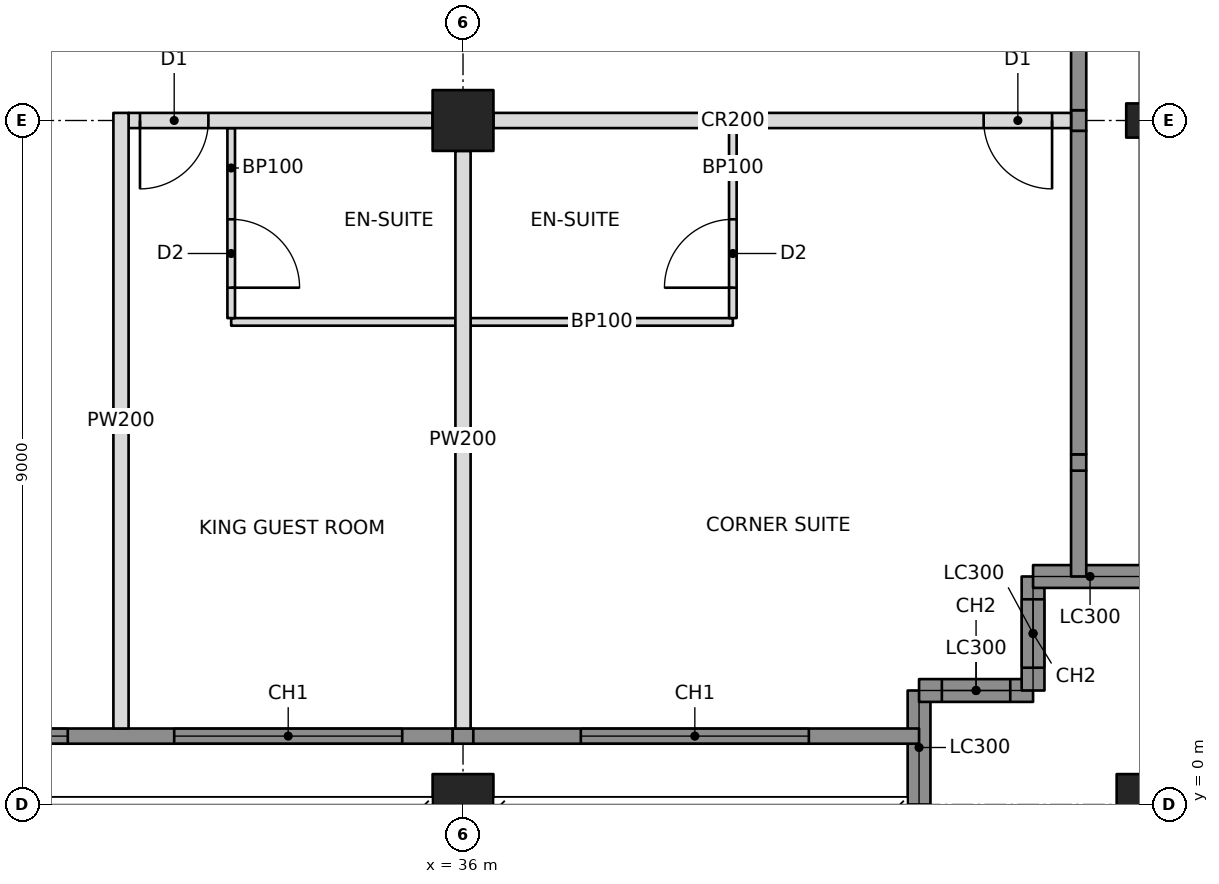
"""IFC4 building model, lengths in metres.
Left out: names, types, materials, properties, quantities, classifications, styles, units other than length and angle.
Written with IfcOpenShell. Run it as: python <this file> out.ifc"""

import sys

from ifc_helpers import new_model, si_unit, direction, frame, frame_2d, origin, origin_2d, place, context, subcontext, project, spatial, rectangle, hollow_rectangle, i_section, extrude, element, fill, save


model = new_model("IFC4")
c1 = context("Model", 3, precision=1e-05, world=origin(), true_north=direction((0.0, 1.0)))
c2 = subcontext(c1, "Body", "Model", "MODEL_VIEW")
j1 = project(units=[si_unit("LENGTHUNIT", "METRE"), si_unit("PLANEANGLEUNIT", "RADIAN")], contexts=[c1])
p1 = place(None, origin())
s1 = spatial("IfcSite", under=j1, at=p1, CompositionType="ELEMENT")
p2 = place(p1, origin())
s2 = spatial("IfcBuilding", under=s1, at=p2, CompositionType="ELEMENT")
p3 = place(p2, frame((0.0, 0.0, 167.2)))
s3 = spatial("IfcBuildingStorey", under=s2, at=p3, CompositionType="ELEMENT", Elevation=167.2)
p4 = place(p3, frame((36.0, 0.0, 0.0), z_axis=(0.0, 0.0, 1.0), x_axis=(1.0, 0.0, 0.0)))
e1 = element("IfcColumn", 1, at=p4, inside=s3, PredefinedType="COLUMN", context=c2, shape_type="SweptSolid", body=[
    extrude(hollow_rectangle(XDim=0.8, YDim=0.8, WallThickness=0.07, at=origin_2d()), origin(), (0.0, 0.0, 1.0), 3.4),
])
p5 = place(p3, frame((36.0, 9.0, 0.0), z_axis=(0.0, 0.0, 1.0), x_axis=(0.0, 1.0, 0.0)))
e2 = element("IfcColumn", 2, at=p5, inside=s3, PredefinedType="COLUMN", context=c2, shape_type="SweptSolid", body=[
    extrude(hollow_rectangle(XDim=0.8, YDim=0.8, WallThickness=0.06, at=origin_2d()), origin(), (0.0, 0.0, 1.0), 3.4),
])
p6 = place(p3, frame((45.0, 0.0, 0.0), z_axis=(0.0, 0.0, 1.0), x_axis=(1.0, 0.0, 0.0)))
e3 = element("IfcColumn", 3, at=p6, inside=s3, PredefinedType="COLUMN", context=c2, shape_type="SweptSolid", body=[
    extrude(hollow_rectangle(XDim=0.8, YDim=0.8, WallThickness=0.07, at=origin_2d()), origin(), (0.0, 0.0, 1.0), 3.4),
])
p7 = place(p3, frame((45.0, 9.0, 0.0), z_axis=(0.0, 0.0, 1.0), x_axis=(0.0, 1.0, 0.0)))
e4 = element("IfcColumn", 4, at=p7, inside=s3, PredefinedType="COLUMN", context=c2, shape_type="SweptSolid", body=[
    extrude(i_section(OverallWidth=0.449, OverallDepth=0.549, WebThickness=0.072, FlangeThickness=0.115, at=origin_2d()), origin(), (0.0, 0.0, 1.0), 3.4),
])
p8 = place(p3, frame((42.0, 0.0, 0.0), z_axis=(0.0, 0.0, 1.0), x_axis=(0.0, 1.0, 0.0)))
e5 = element("IfcWall", 5, at=p8, inside=s3, PredefinedType="SOLIDWALL", context=c2, shape_type="SweptSolid", body=[
    extrude(rectangle(XDim=1.5, YDim=0.3, at=frame_2d((0.75, 0.0))), origin(), (0.0, 0.0, 1.0), 2.42),
])
p9 = place(p3, frame((42.0, 1.5, 0.0), z_axis=(0.0, 0.0, 1.0), x_axis=(1.0, 0.0, 0.0)))
e6 = element("IfcWall", 6, at=p9, inside=s3, PredefinedType="SOLIDWALL", context=c2, shape_type="SweptSolid", body=[
    extrude(rectangle(XDim=1.5, YDim=0.3, at=frame_2d((0.75, 0.0))), origin(), (0.0, 0.0, 1.0), 3.2),
])
p10 = place(p9, frame((0.3, 0.0, 0.6)))
e7 = element("IfcOpeningElement", 7, at=p10, cuts=e6, PredefinedType="OPENING", context=c2, shape_type="SweptSolid", body=[
    extrude(rectangle(XDim=0.9, YDim=2.2, at=frame_2d((0.45, 1.1))), frame((0.0, 0.16, 0.0), z_axis=(0.0, -1.0, 0.0), x_axis=(1.0, 0.0, 0.0)), (0.0, 0.0, 1.0), 0.32),
])
p11 = place(p3, frame((43.5, 1.5, 0.0), z_axis=(0.0, 0.0, 1.0), x_axis=(0.0, 1.0, 0.0)))
e8 = element("IfcWall", 8, at=p11, inside=s3, PredefinedType="SOLIDWALL", context=c2, shape_type="SweptSolid", body=[
    extrude(rectangle(XDim=1.5, YDim=0.3, at=frame_2d((0.75, 0.0))), origin(), (0.0, 0.0, 1.0), 3.2),
])
p12 = place(p11, frame((0.3, 0.0, 0.6)))
e9 = element("IfcOpeningElement", 9, at=p12, cuts=e8, PredefinedType="OPENING", context=c2, shape_type="SweptSolid", body=[
    extrude(rectangle(XDim=0.9, YDim=2.2, at=frame_2d((0.45, 1.1))), frame((0.0, 0.16, 0.0), z_axis=(0.0, -1.0, 0.0), x_axis=(1.0, 0.0, 0.0)), (0.0, 0.0, 1.0), 0.32),
])
p13 = place(p3, frame((43.5, 3.0, 0.0), z_axis=(0.0, 0.0, 1.0), x_axis=(1.0, 0.0, 0.0)))
e10 = element("IfcWall", 10, at=p13, inside=s3, PredefinedType="SOLIDWALL", context=c2, shape_type="SweptSolid", body=[
    extrude(rectangle(XDim=1.5, YDim=0.3, at=frame_2d((0.75, 0.0))), origin(), (0.0, 0.0, 1.0), 2.42),
])
p14 = place(p3, frame((44.1, 3.0, 0.0), z_axis=(0.0, 0.0, 1.0), x_axis=(0.0, 1.0, 0.0)))
e11 = element("IfcWall", 11, at=p14, inside=s3, PredefinedType="SOLIDWALL", context=c2, shape_type="SweptSolid", body=[
    extrude(rectangle(XDim=1.393, YDim=0.2, at=frame_2d((0.696, 0.0))), origin(), (0.0, 0.0, 1.0), 3.2),
])
p15 = place(p3, frame((31.6, 9.0, 0.0), z_axis=(0.0, 0.0, 1.0), x_axis=(1.0, 0.0, 0.0)))
e12 = element("IfcWall", 12, at=p15, inside=s3, PredefinedType="PARTITIONING", context=c2, shape_type="SweptSolid", body=[
    extrude(rectangle(XDim=4.0, YDim=0.2, at=frame_2d((2.0, 0.0))), origin(), (0.0, 0.0, 1.0), 2.405),
])
p16 = place(p15, frame((0.15, 0.0, 0.0)))
e13 = element("IfcOpeningElement", 13, at=p16, cuts=e12, PredefinedType="OPENING", context=c2, shape_type="SweptSolid", body=[
    extrude(rectangle(XDim=0.9, YDim=2.1, at=frame_2d((0.45, 1.05))), frame((0.0, 0.11, 0.0), z_axis=(0.0, -1.0, 0.0), x_axis=(1.0, 0.0, 0.0)), (0.0, 0.0, 1.0), 0.22),
])
p17 = place(p3, frame((36.4, 9.0, 0.0), z_axis=(0.0, 0.0, 1.0), x_axis=(1.0, 0.0, 0.0)))
e14 = element("IfcWall", 14, at=p17, inside=s3, PredefinedType="PARTITIONING", context=c2, shape_type="SweptSolid", body=[
    extrude(rectangle(XDim=7.6, YDim=0.2, at=frame_2d((3.8, 0.0))), origin(), (0.0, 0.0, 1.0), 2.438),
])
p18 = place(p17, frame((6.45, 0.0, 0.0)))
e15 = element("IfcOpeningElement", 15, at=p18, cuts=e14, PredefinedType="OPENING", context=c2, shape_type="SweptSolid", body=[
    extrude(rectangle(XDim=0.9, YDim=2.1, at=frame_2d((0.45, 1.05))), frame((0.0, 0.11, 0.0), z_axis=(0.0, -1.0, 0.0), x_axis=(1.0, 0.0, 0.0)), (0.0, 0.0, 1.0), 0.22),
])
p19 = place(p3, frame((31.5, 9.1, 0.0), z_axis=(0.0, 0.0, 1.0), x_axis=(0.0, -1.0, 0.0)))
e16 = element("IfcWall", 16, at=p19, inside=s3, PredefinedType="PARTITIONING", context=c2, shape_type="SweptSolid", body=[
    extrude(rectangle(XDim=8.1, YDim=0.2, at=frame_2d((4.05, 0.0))), origin(), (0.0, 0.0, 1.0), 2.404),
])
p20 = place(p3, frame((36.0, 8.6, 0.0), z_axis=(0.0, 0.0, 1.0), x_axis=(0.0, -1.0, 0.0)))
e17 = element("IfcWall", 17, at=p20, inside=s3, PredefinedType="PARTITIONING", context=c2, shape_type="SweptSolid", body=[
    extrude(rectangle(XDim=7.6, YDim=0.2, at=frame_2d((3.8, 0.0))), origin(), (0.0, 0.0, 1.0), 2.438),
])
p21 = place(p3, frame((32.95, 6.35, 0.0), z_axis=(0.0, 0.0, 1.0), x_axis=(1.0, 0.0, 0.0)))
e18 = element("IfcWall", 18, at=p21, inside=s3, PredefinedType="PARTITIONING", context=c2, shape_type="SweptSolid", body=[
    extrude(rectangle(XDim=2.95, YDim=0.1, at=frame_2d((1.475, 0.0))), origin(), (0.0, 0.0, 1.0), 2.438),
])
p22 = place(p3, frame((32.95, 8.9, 0.0), z_axis=(0.0, 0.0, 1.0), x_axis=(0.0, -1.0, 0.0)))
e19 = element("IfcWall", 19, at=p22, inside=s3, PredefinedType="PARTITIONING", context=c2, shape_type="SweptSolid", body=[
    extrude(rectangle(XDim=2.5, YDim=0.1, at=frame_2d((1.25, 0.0))), origin(), (0.0, 0.0, 1.0), 2.404),
])
p23 = place(p22, frame((1.2, 0.0, 0.0)))
e20 = element("IfcOpeningElement", 20, at=p23, cuts=e19, PredefinedType="OPENING", context=c2, shape_type="SweptSolid", body=[
    extrude(rectangle(XDim=0.9, YDim=2.1, at=frame_2d((0.45, 1.05))), frame((0.0, 0.06, 0.0), z_axis=(0.0, -1.0, 0.0), x_axis=(1.0, 0.0, 0.0)), (0.0, 0.0, 1.0), 0.12),
])
p24 = place(p3, frame((36.1, 6.35, 0.0), z_axis=(0.0, 0.0, 1.0), x_axis=(1.0, 0.0, 0.0)))
e21 = element("IfcWall", 21, at=p24, inside=s3, PredefinedType="PARTITIONING", context=c2, shape_type="SweptSolid", body=[
    extrude(rectangle(XDim=3.45, YDim=0.1, at=frame_2d((1.725, 0.0))), origin(), (0.0, 0.0, 1.0), 2.438),
])
p25 = place(p3, frame((39.55, 8.9, 0.0), z_axis=(0.0, 0.0, 1.0), x_axis=(0.0, -1.0, 0.0)))
e22 = element("IfcWall", 22, at=p25, inside=s3, PredefinedType="PARTITIONING", context=c2, shape_type="SweptSolid", body=[
    extrude(rectangle(XDim=2.5, YDim=0.1, at=frame_2d((1.25, 0.0))), origin(), (0.0, 0.0, 1.0), 2.438),
])
p26 = place(p25, frame((1.2, 0.0, 0.0)))
e23 = element("IfcOpeningElement", 23, at=p26, cuts=e22, PredefinedType="OPENING", context=c2, shape_type="SweptSolid", body=[
    extrude(rectangle(XDim=0.9, YDim=2.1, at=frame_2d((0.45, 1.05))), frame((0.0, 0.06, 0.0), z_axis=(0.0, -1.0, 0.0), x_axis=(1.0, 0.0, 0.0)), (0.0, 0.0, 1.0), 0.12),
])
p27 = place(p3, frame((27.194, 0.9, 0.0), z_axis=(0.0, 0.0, 1.0), x_axis=(1.0, 0.0, 0.0)))
e24 = element("IfcWall", 24, at=p27, inside=s3, PredefinedType="SOLIDWALL", context=c2, shape_type="SweptSolid", body=[
    extrude(rectangle(XDim=8.671, YDim=0.2, at=frame_2d((4.335, 0.0))), origin(), (0.0, 0.0, 1.0), 3.2),
])
p28 = place(p27, frame((0.606, 0.0, 0.6)))
e25 = element("IfcOpeningElement", 25, at=p28, cuts=e24, PredefinedType="OPENING", context=c2, shape_type="SweptSolid", body=[
    extrude(rectangle(XDim=3.0, YDim=2.2, at=frame_2d((1.5, 1.1))), frame((0.0, 0.11, 0.0), z_axis=(0.0, -1.0, 0.0), x_axis=(1.0, 0.0, 0.0)), (0.0, 0.0, 1.0), 0.22),
])
p29 = place(p27, frame((5.006, 0.0, 0.6)))
e26 = element("IfcOpeningElement", 26, at=p29, cuts=e24, PredefinedType="OPENING", context=c2, shape_type="SweptSolid", body=[
    extrude(rectangle(XDim=3.0, YDim=2.2, at=frame_2d((1.5, 1.1))), frame((0.0, 0.11, 0.0), z_axis=(0.0, -1.0, 0.0), x_axis=(1.0, 0.0, 0.0)), (0.0, 0.0, 1.0), 0.22),
])
p30 = place(p3, frame((35.865, 0.9, 0.0), z_axis=(0.0, 0.0, 1.0), x_axis=(1.0, 0.0, 0.0)))
e27 = element("IfcWall", 27, at=p30, inside=s3, PredefinedType="SOLIDWALL", context=c2, shape_type="SweptSolid", body=[
    extrude(rectangle(XDim=0.271, YDim=0.2, at=frame_2d((0.135, 0.0))), origin(), (0.0, 0.0, 1.0), 2.438),
])
p31 = place(p3, frame((36.135, 0.9, 0.0), z_axis=(0.0, 0.0, 1.0), x_axis=(1.0, 0.0, 0.0)))
e28 = element("IfcWall", 28, at=p31, inside=s3, PredefinedType="SOLIDWALL", context=c2, shape_type="SweptSolid", body=[
    extrude(rectangle(XDim=5.865, YDim=0.2, at=frame_2d((2.932, 0.0))), origin(), (0.0, 0.0, 1.0), 3.2),
])
p32 = place(p31, frame((1.415, 0.0, 0.6)))
e29 = element("IfcOpeningElement", 29, at=p32, cuts=e28, PredefinedType="OPENING", context=c2, shape_type="SweptSolid", body=[
    extrude(rectangle(XDim=3.0, YDim=2.2, at=frame_2d((1.5, 1.1))), frame((0.0, 0.11, 0.0), z_axis=(0.0, -1.0, 0.0), x_axis=(1.0, 0.0, 0.0)), (0.0, 0.0, 1.0), 0.22),
])
p33 = place(p3, frame((44.1, 4.393, 0.0), z_axis=(0.0, 0.0, 1.0), x_axis=(0.0, 1.0, 0.0)))
e30 = element("IfcWall", 30, at=p33, inside=s3, PredefinedType="SOLIDWALL", context=c2, shape_type="SweptSolid", body=[
    extrude(rectangle(XDim=0.215, YDim=0.2, at=frame_2d((0.107, 0.0))), origin(), (0.0, 0.0, 1.0), 2.661),
])
p34 = place(p3, frame((44.1, 4.607, 0.0), z_axis=(0.0, 0.0, 1.0), x_axis=(0.0, 1.0, 0.0)))
e31 = element("IfcWall", 31, at=p34, inside=s3, PredefinedType="SOLIDWALL", context=c2, shape_type="SweptSolid", body=[
    extrude(rectangle(XDim=4.257, YDim=0.2, at=frame_2d((2.129, 0.0))), origin(), (0.0, 0.0, 1.0), 3.2),
])
p35 = place(p3, frame((44.1, 8.865, 0.0), z_axis=(0.0, 0.0, 1.0), x_axis=(0.0, 1.0, 0.0)))
e32 = element("IfcWall", 32, at=p35, inside=s3, PredefinedType="SOLIDWALL", context=c2, shape_type="SweptSolid", body=[
    extrude(rectangle(XDim=0.271, YDim=0.2, at=frame_2d((0.135, 0.0))), origin(), (0.0, 0.0, 1.0), 2.438),
])
p36 = place(p3, frame((44.1, 9.135, 0.0), z_axis=(0.0, 0.0, 1.0), x_axis=(0.0, 1.0, 0.0)))
e33 = element("IfcWall", 33, at=p36, inside=s3, PredefinedType="SOLIDWALL", context=c2, shape_type="SweptSolid", body=[
    extrude(rectangle(XDim=8.671, YDim=0.2, at=frame_2d((4.335, 0.0))), origin(), (0.0, 0.0, 1.0), 3.2),
])
p37 = place(p36, frame((2.015, 0.0, 0.6)))
e34 = element("IfcOpeningElement", 34, at=p37, cuts=e33, PredefinedType="OPENING", context=c2, shape_type="SweptSolid", body=[
    extrude(rectangle(XDim=3.0, YDim=2.2, at=frame_2d((1.5, 1.1))), frame((0.0, 0.11, 0.0), z_axis=(0.0, -1.0, 0.0), x_axis=(1.0, 0.0, 0.0)), (0.0, 0.0, 1.0), 0.22),
])
p38 = place(p36, frame((5.515, 0.0, 0.6)))
e35 = element("IfcOpeningElement", 35, at=p38, cuts=e33, PredefinedType="OPENING", context=c2, shape_type="SweptSolid", body=[
    extrude(rectangle(XDim=3.0, YDim=2.2, at=frame_2d((1.5, 1.1))), frame((0.0, 0.11, 0.0), z_axis=(0.0, -1.0, 0.0), x_axis=(1.0, 0.0, 0.0)), (0.0, 0.0, 1.0), 0.22),
])
p39 = place(p10, origin())
e36 = element("IfcWindow", 36, at=p39, inside=s3, PartitioningType="SINGLE_PANEL", PredefinedType="WINDOW", context=c2, shape_type="SweptSolid", body=[
    extrude(rectangle(XDim=0.9, YDim=2.2, at=frame_2d((0.45, 1.1))), frame((0.0, 0.03, 0.0), z_axis=(0.0, -1.0, 0.0), x_axis=(1.0, 0.0, 0.0)), (0.0, 0.0, 1.0), 0.06),
])
fill(e7, e36)
p40 = place(p12, origin())
e37 = element("IfcWindow", 37, at=p40, inside=s3, PartitioningType="SINGLE_PANEL", PredefinedType="WINDOW", context=c2, shape_type="SweptSolid", body=[
    extrude(rectangle(XDim=0.9, YDim=2.2, at=frame_2d((0.45, 1.1))), frame((0.0, 0.03, 0.0), z_axis=(0.0, -1.0, 0.0), x_axis=(1.0, 0.0, 0.0)), (0.0, 0.0, 1.0), 0.06),
])
fill(e9, e37)
p41 = place(p28, origin())
e38 = element("IfcWindow", 38, at=p41, inside=s3, PartitioningType="TRIPLE_PANEL_VERTICAL", PredefinedType="WINDOW", context=c2, shape_type="SweptSolid", body=[
    extrude(rectangle(XDim=3.0, YDim=2.2, at=frame_2d((1.5, 1.1))), frame((0.0, 0.03, 0.0), z_axis=(0.0, -1.0, 0.0), x_axis=(1.0, 0.0, 0.0)), (0.0, 0.0, 1.0), 0.06),
])
fill(e25, e38)
p42 = place(p29, origin())
e39 = element("IfcWindow", 39, at=p42, inside=s3, PartitioningType="TRIPLE_PANEL_VERTICAL", PredefinedType="WINDOW", context=c2, shape_type="SweptSolid", body=[
    extrude(rectangle(XDim=3.0, YDim=2.2, at=frame_2d((1.5, 1.1))), frame((0.0, 0.03, 0.0), z_axis=(0.0, -1.0, 0.0), x_axis=(1.0, 0.0, 0.0)), (0.0, 0.0, 1.0), 0.06),
])
fill(e26, e39)
p43 = place(p32, origin())
e40 = element("IfcWindow", 40, at=p43, inside=s3, PartitioningType="TRIPLE_PANEL_VERTICAL", PredefinedType="WINDOW", context=c2, shape_type="SweptSolid", body=[
    extrude(rectangle(XDim=3.0, YDim=2.2, at=frame_2d((1.5, 1.1))), frame((0.0, 0.03, 0.0), z_axis=(0.0, -1.0, 0.0), x_axis=(1.0, 0.0, 0.0)), (0.0, 0.0, 1.0), 0.06),
])
fill(e29, e40)
p44 = place(p23, origin())
e41 = element("IfcDoor", 41, at=p44, inside=s3, OperationType="SINGLE_SWING_RIGHT", PredefinedType="DOOR", context=c2, shape_type="SweptSolid", body=[
    extrude(rectangle(XDim=0.9, YDim=2.1, at=frame_2d((0.45, 1.05))), frame((0.0, 0.025, 0.0), z_axis=(0.0, -1.0, 0.0), x_axis=(1.0, 0.0, 0.0)), (0.0, 0.0, 1.0), 0.05),
])
fill(e20, e41)
p45 = place(p16, frame((0.9, 0.0, 0.0), z_axis=(0.0, 0.0, 1.0), x_axis=(-1.0, 0.0, 0.0)))
e42 = element("IfcDoor", 42, at=p45, inside=s3, OperationType="SINGLE_SWING_RIGHT", PredefinedType="DOOR", context=c2, shape_type="SweptSolid", body=[
    extrude(rectangle(XDim=0.9, YDim=2.1, at=frame_2d((0.45, 1.05))), frame((0.0, 0.025, 0.0), z_axis=(0.0, -1.0, 0.0), x_axis=(1.0, 0.0, 0.0)), (0.0, 0.0, 1.0), 0.05),
])
fill(e13, e42)
p46 = place(p26, frame((0.9, 0.0, 0.0), z_axis=(0.0, 0.0, 1.0), x_axis=(-1.0, 0.0, 0.0)))
e43 = element("IfcDoor", 43, at=p46, inside=s3, OperationType="SINGLE_SWING_LEFT", PredefinedType="DOOR", context=c2, shape_type="SweptSolid", body=[
    extrude(rectangle(XDim=0.9, YDim=2.1, at=frame_2d((0.45, 1.05))), frame((0.0, 0.025, 0.0), z_axis=(0.0, -1.0, 0.0), x_axis=(1.0, 0.0, 0.0)), (0.0, 0.0, 1.0), 0.05),
])
fill(e23, e43)
p47 = place(p18, frame((0.9, 0.0, 0.0), z_axis=(0.0, 0.0, 1.0), x_axis=(-1.0, 0.0, 0.0)))
e44 = element("IfcDoor", 44, at=p47, inside=s3, OperationType="SINGLE_SWING_LEFT", PredefinedType="DOOR", context=c2, shape_type="SweptSolid", body=[
    extrude(rectangle(XDim=0.9, YDim=2.1, at=frame_2d((0.45, 1.05))), frame((0.0, 0.025, 0.0), z_axis=(0.0, -1.0, 0.0), x_axis=(1.0, 0.0, 0.0)), (0.0, 0.0, 1.0), 0.05),
])
fill(e15, e44)
save(model, sys.argv[1])
